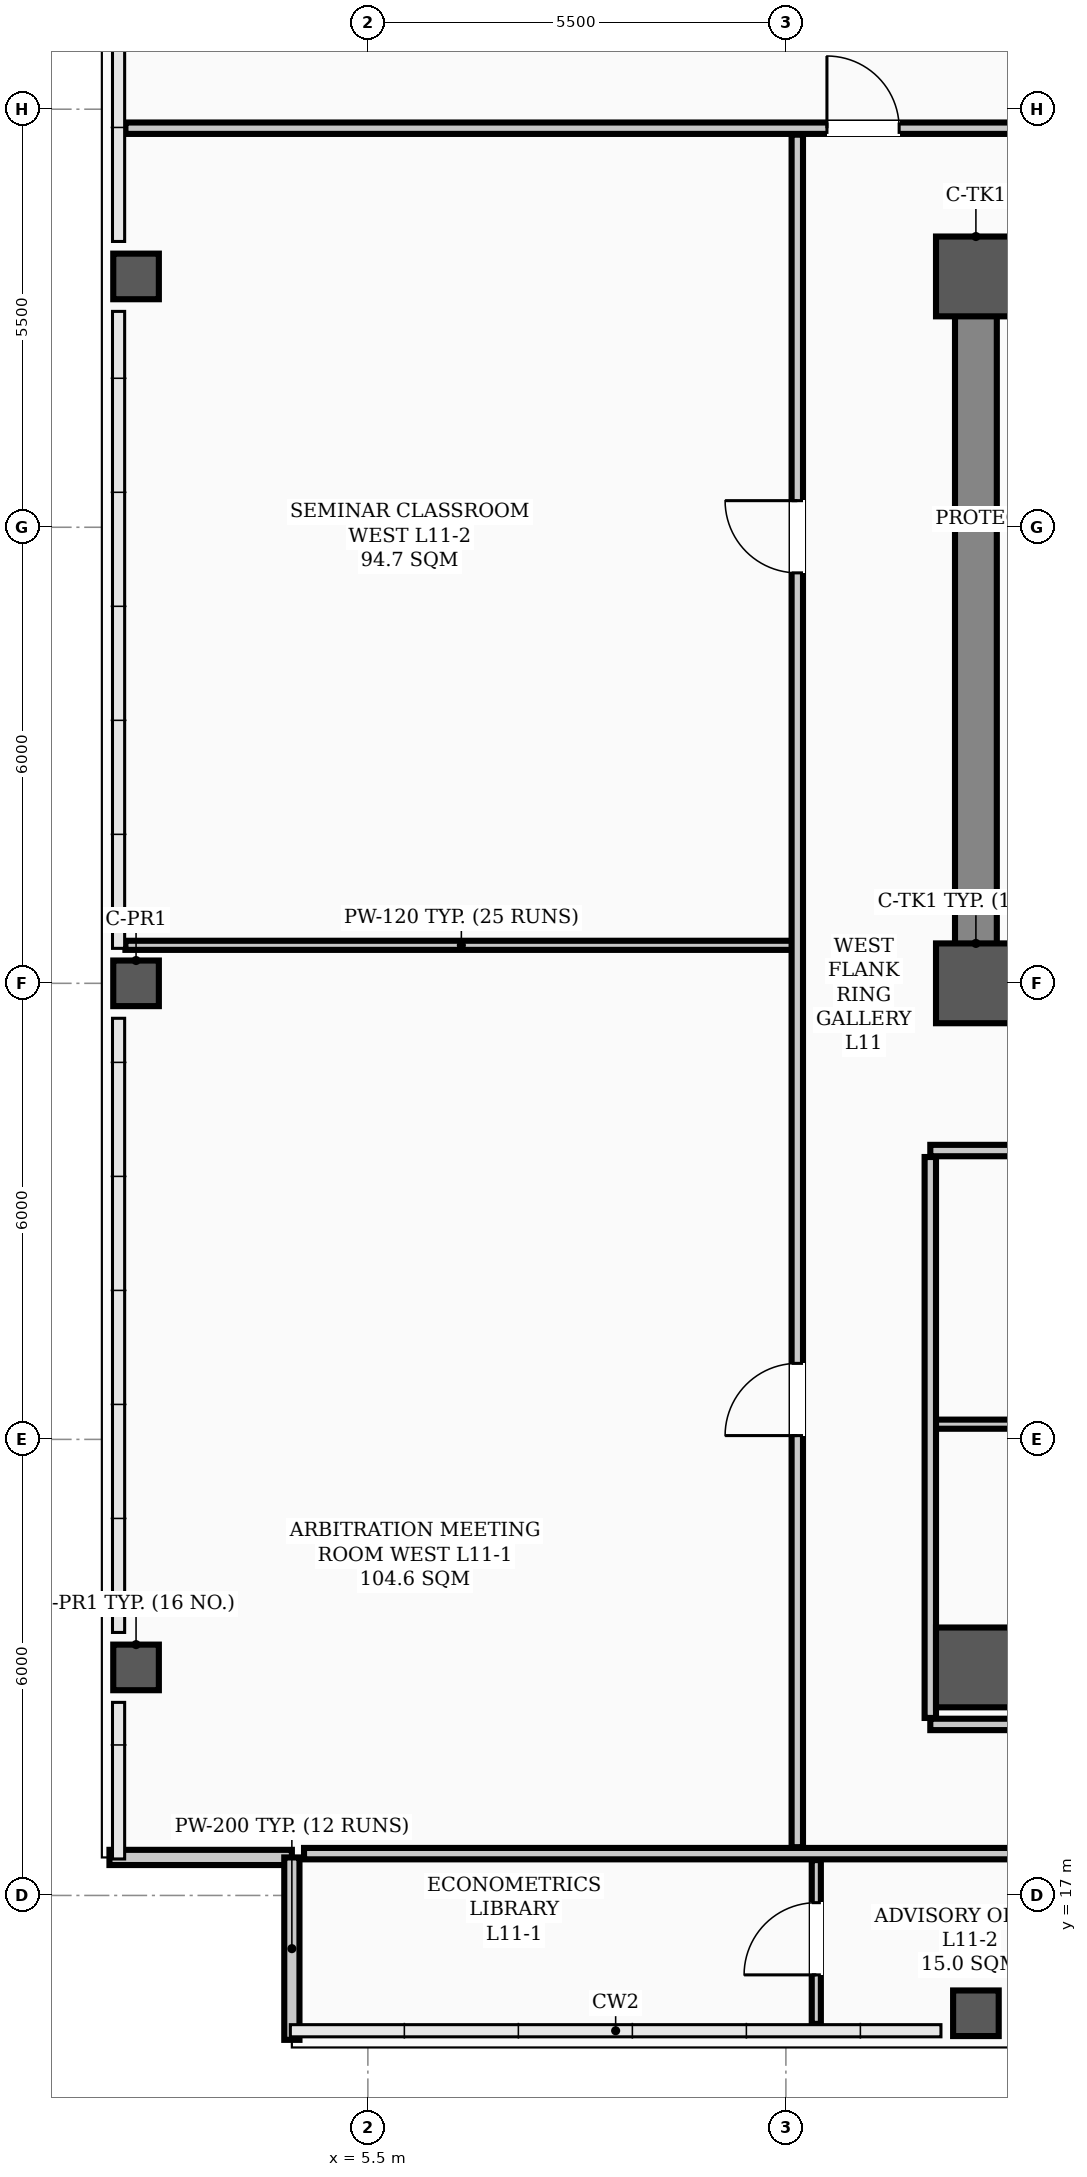
"""IFC4 building model, lengths in metres.
Left out: names, types, materials, properties, quantities, classifications, styles, units other than length and angle.
Written with IfcOpenShell. Run it as: python <this file> out.ifc"""

import sys

from ifc_helpers import new_model, si_unit, direction, frame, frame_2d, origin, origin_2d, place, context, subcontext, project, spatial, rectangle, hollow_rectangle, extrude, element, fill, save


model = new_model("IFC4")
c1 = context("Model", 3, precision=1e-05, world=origin(), true_north=direction((0.0, 1.0)))
c2 = subcontext(c1, "Body", "Model", "MODEL_VIEW")
j1 = project(units=[si_unit("LENGTHUNIT", "METRE"), si_unit("PLANEANGLEUNIT", "RADIAN")], contexts=[c1])
p1 = place(None, origin())
s1 = spatial("IfcSite", under=j1, at=p1, CompositionType="ELEMENT")
p2 = place(p1, origin())
s2 = spatial("IfcBuilding", under=s1, at=p2, CompositionType="ELEMENT")
p3 = place(p2, frame((0.0, 0.0, 46.0)))
s3 = spatial("IfcBuildingStorey", under=s2, at=p3, CompositionType="ELEMENT", Elevation=46.0)
for number, where, z_axis, x_axis in (
    (1, (13.5, 29.0, 0.0), (0.0, 0.0, 1.0), (1.0, 0.0, 0.0)),
    (2, (13.5, 38.3, 0.0), (0.0, 0.0, 1.0), (1.0, 0.0, 0.0)),
    (3, (13.5, 20.0, 0.0), (0.0, 0.0, 1.0), (1.0, 0.0, 0.0)),
):
    element("IfcColumn", number, at=place(p3, frame(where, z_axis=z_axis, x_axis=x_axis)), inside=s3, PredefinedType="COLUMN", context=c2, shape_type="SweptSolid", body=[
        extrude(hollow_rectangle(XDim=1.05, YDim=1.05, WallThickness=0.038, InnerFilletRadius=0.019, OuterFilletRadius=0.057, at=origin_2d()), origin(), (0.0, 0.0, 1.0), 3.9),
    ])
for number, where, z_axis, x_axis in (
    (4, (2.45, 20.0, 0.0), (0.0, 0.0, 1.0), (1.0, 0.0, 0.0)),
    (5, (2.45, 29.0, 0.0), (0.0, 0.0, 1.0), (1.0, 0.0, 0.0)),
    (6, (2.45, 38.3, 0.0), (0.0, 0.0, 1.0), (1.0, 0.0, 0.0)),
    (7, (13.5, 15.45, 0.0), (0.0, 0.0, 1.0), (1.0, 0.0, 0.0)),
):
    element("IfcColumn", number, at=place(p3, frame(where, z_axis=z_axis, x_axis=x_axis)), inside=s3, PredefinedType="COLUMN", context=c2, shape_type="SweptSolid", body=[
        extrude(hollow_rectangle(XDim=0.6, YDim=0.6, WallThickness=0.026, InnerFilletRadius=0.013, OuterFilletRadius=0.039, at=origin_2d()), origin(), (0.0, 0.0, 1.0), 3.9),
    ])
for number, where, z_axis, x_axis in (
    (8, (2.1, 17.5, 0.0), (0.0, 0.0, 1.0), (1.0, 0.0, 0.0)),
    (9, (4.5, 17.5, 0.0), (0.0, 0.0, 1.0), (0.0, -1.0, 0.0)),
):
    element("IfcWall", number, at=place(p3, frame(where, z_axis=z_axis, x_axis=x_axis)), inside=s3, PredefinedType="PARAPET", context=c2, shape_type="SweptSolid", body=[
        extrude(rectangle(XDim=2.4, YDim=0.2, at=frame_2d((1.2, 0.0))), origin(), (0.0, 0.0, 1.0), 1.2),
    ])
p4 = place(p3, frame((13.5, 29.0, 0.0), z_axis=(0.0, 0.0, 1.0), x_axis=(1.0, 0.0, 0.0)))
e10 = element("IfcWall", 10, at=p4, inside=s3, PredefinedType="SHEAR", context=c2, shape_type="SweptSolid", body=[
    extrude(rectangle(XDim=30.5, YDim=0.55, at=frame_2d((15.25, 0.0))), origin(), (0.0, 0.0, 1.0), 3.72),
])
p5 = place(p4, frame((1.75, 0.0, 0.0)))
e11 = element("IfcOpeningElement", 11, at=p5, cuts=e10, PredefinedType="OPENING", context=c2, shape_type="SweptSolid", body=[
    extrude(rectangle(XDim=1.1, YDim=2.08, at=frame_2d((0.55, 1.04))), frame((0.0, 0.285, 0.0), z_axis=(0.0, -1.0, 0.0), x_axis=(1.0, 0.0, 0.0)), (0.0, 0.0, 1.0), 0.57),
])
p6 = place(p4, frame((26.7, 0.0, 0.0)))
e12 = element("IfcOpeningElement", 12, at=p6, cuts=e10, PredefinedType="OPENING", context=c2, shape_type="SweptSolid", body=[
    extrude(rectangle(XDim=1.1, YDim=2.08, at=frame_2d((0.55, 1.04))), frame((0.0, 0.285, 0.0), z_axis=(0.0, -1.0, 0.0), x_axis=(1.0, 0.0, 0.0)), (0.0, 0.0, 1.0), 0.57),
])
p7 = place(p4, frame((6.8, 0.0, 0.0)))
e13 = element("IfcOpeningElement", 13, at=p7, cuts=e10, PredefinedType="OPENING", context=c2, shape_type="SweptSolid", body=[
    extrude(rectangle(XDim=1.1, YDim=2.08, at=frame_2d((0.55, 1.04))), frame((0.0, 0.285, 0.0), z_axis=(0.0, -1.0, 0.0), x_axis=(1.0, 0.0, 0.0)), (0.0, 0.0, 1.0), 0.57),
])
p8 = place(p4, frame((13.2, 0.0, 0.0)))
e14 = element("IfcOpeningElement", 14, at=p8, cuts=e10, PredefinedType="OPENING", context=c2, shape_type="SweptSolid", body=[
    extrude(rectangle(XDim=1.6, YDim=2.08, at=frame_2d((0.8, 1.04))), frame((0.0, 0.285, 0.0), z_axis=(0.0, -1.0, 0.0), x_axis=(1.0, 0.0, 0.0)), (0.0, 0.0, 1.0), 0.57),
])
p9 = place(p4, frame((19.6, 0.0, 0.0)))
e15 = element("IfcOpeningElement", 15, at=p9, cuts=e10, PredefinedType="OPENING", context=c2, shape_type="SweptSolid", body=[
    extrude(rectangle(XDim=0.9, YDim=2.08, at=frame_2d((0.45, 1.04))), frame((0.0, 0.285, 0.0), z_axis=(0.0, -1.0, 0.0), x_axis=(1.0, 0.0, 0.0)), (0.0, 0.0, 1.0), 0.57),
])
p10 = place(p4, frame((21.6, 0.0, 0.0)))
e16 = element("IfcOpeningElement", 16, at=p10, cuts=e10, PredefinedType="OPENING", context=c2, shape_type="SweptSolid", body=[
    extrude(rectangle(XDim=0.9, YDim=2.08, at=frame_2d((0.45, 1.04))), frame((0.0, 0.285, 0.0), z_axis=(0.0, -1.0, 0.0), x_axis=(1.0, 0.0, 0.0)), (0.0, 0.0, 1.0), 0.57),
])
p11 = place(p3, frame((13.5, 38.3, 0.0), z_axis=(0.0, 0.0, 1.0), x_axis=(1.0, 0.0, 0.0)))
e17 = element("IfcWall", 17, at=p11, inside=s3, PredefinedType="SHEAR", context=c2, shape_type="SweptSolid", body=[
    extrude(rectangle(XDim=30.5, YDim=0.55, at=frame_2d((15.25, 0.0))), origin(), (0.0, 0.0, 1.0), 3.72),
])
p12 = place(p3, frame((13.5, 29.35, 0.0), z_axis=(0.0, 0.0, 1.0), x_axis=(0.0, 1.0, 0.0)))
e18 = element("IfcWall", 18, at=p12, inside=s3, PredefinedType="SHEAR", context=c2, shape_type="SweptSolid", body=[
    extrude(rectangle(XDim=8.6, YDim=0.55, at=frame_2d((4.3, 0.0))), origin(), (0.0, 0.0, 1.0), 3.72),
])
p13 = place(p3, frame((12.9, 26.8, 0.0), z_axis=(0.0, 0.0, 1.0), x_axis=(1.0, 0.0, 0.0)))
e19 = element("IfcWall", 19, at=p13, inside=s3, PredefinedType="PARTITIONING", context=c2, shape_type="SweptSolid", body=[
    extrude(rectangle(XDim=31.7, YDim=0.15, at=frame_2d((15.85, 0.0))), origin(), (0.0, 0.0, 1.0), 3.1),
])
p14 = place(p13, frame((13.6, 0.0, 0.0)))
e20 = element("IfcOpeningElement", 20, at=p14, cuts=e19, PredefinedType="OPENING", context=c2, shape_type="SweptSolid", body=[
    extrude(rectangle(XDim=1.6, YDim=2.08, at=frame_2d((0.8, 1.04))), frame((0.0, 0.085, 0.0), z_axis=(0.0, -1.0, 0.0), x_axis=(1.0, 0.0, 0.0)), (0.0, 0.0, 1.0), 0.17),
])
p15 = place(p13, frame((2.175, 0.0, 0.0)))
e21 = element("IfcOpeningElement", 21, at=p15, cuts=e19, PredefinedType="OPENING", context=c2, shape_type="SweptSolid", body=[
    extrude(rectangle(XDim=0.95, YDim=2.08, at=frame_2d((0.475, 1.04))), frame((0.0, 0.085, 0.0), z_axis=(0.0, -1.0, 0.0), x_axis=(1.0, 0.0, 0.0)), (0.0, 0.0, 1.0), 0.17),
])
p16 = place(p13, frame((6.925, 0.0, 0.0)))
e22 = element("IfcOpeningElement", 22, at=p16, cuts=e19, PredefinedType="OPENING", context=c2, shape_type="SweptSolid", body=[
    extrude(rectangle(XDim=0.95, YDim=2.08, at=frame_2d((0.475, 1.04))), frame((0.0, 0.085, 0.0), z_axis=(0.0, -1.0, 0.0), x_axis=(1.0, 0.0, 0.0)), (0.0, 0.0, 1.0), 0.17),
])
p17 = place(p13, frame((10.925, 0.0, 0.0)))
e23 = element("IfcOpeningElement", 23, at=p17, cuts=e19, PredefinedType="OPENING", context=c2, shape_type="SweptSolid", body=[
    extrude(rectangle(XDim=0.95, YDim=2.08, at=frame_2d((0.475, 1.04))), frame((0.0, 0.085, 0.0), z_axis=(0.0, -1.0, 0.0), x_axis=(1.0, 0.0, 0.0)), (0.0, 0.0, 1.0), 0.17),
])
p18 = place(p13, frame((16.025, 0.0, 0.0)))
e24 = element("IfcOpeningElement", 24, at=p18, cuts=e19, PredefinedType="OPENING", context=c2, shape_type="SweptSolid", body=[
    extrude(rectangle(XDim=0.95, YDim=2.08, at=frame_2d((0.475, 1.04))), frame((0.0, 0.085, 0.0), z_axis=(0.0, -1.0, 0.0), x_axis=(1.0, 0.0, 0.0)), (0.0, 0.0, 1.0), 0.17),
])
p19 = place(p13, frame((21.725, 0.0, 0.0)))
e25 = element("IfcOpeningElement", 25, at=p19, cuts=e19, PredefinedType="OPENING", context=c2, shape_type="SweptSolid", body=[
    extrude(rectangle(XDim=0.95, YDim=2.08, at=frame_2d((0.475, 1.04))), frame((0.0, 0.085, 0.0), z_axis=(0.0, -1.0, 0.0), x_axis=(1.0, 0.0, 0.0)), (0.0, 0.0, 1.0), 0.17),
])
p20 = place(p13, frame((27.925, 0.0, 0.0)))
e26 = element("IfcOpeningElement", 26, at=p20, cuts=e19, PredefinedType="OPENING", context=c2, shape_type="SweptSolid", body=[
    extrude(rectangle(XDim=0.95, YDim=2.08, at=frame_2d((0.475, 1.04))), frame((0.0, 0.085, 0.0), z_axis=(0.0, -1.0, 0.0), x_axis=(1.0, 0.0, 0.0)), (0.0, 0.0, 1.0), 0.17),
])
p21 = place(p3, frame((4.66, 17.55, 0.0), z_axis=(0.0, 0.0, 1.0), x_axis=(1.0, 0.0, 0.0)))
e27 = element("IfcWall", 27, at=p21, inside=s3, PredefinedType="PARTITIONING", context=c2, shape_type="SweptSolid", body=[
    extrude(rectangle(XDim=44.68, YDim=0.15, at=frame_2d((22.34, 0.0))), origin(), (0.0, 0.0, 1.0), 3.1),
])
p22 = place(p21, frame((10.565, 0.0, 0.0)))
e28 = element("IfcOpeningElement", 28, at=p22, cuts=e27, PredefinedType="OPENING", context=c2, shape_type="SweptSolid", body=[
    extrude(rectangle(XDim=0.95, YDim=2.08, at=frame_2d((0.475, 1.04))), frame((0.0, 0.085, 0.0), z_axis=(0.0, -1.0, 0.0), x_axis=(1.0, 0.0, 0.0)), (0.0, 0.0, 1.0), 0.17),
])
p23 = place(p21, frame((16.165, 0.0, 0.0)))
e29 = element("IfcOpeningElement", 29, at=p23, cuts=e27, PredefinedType="OPENING", context=c2, shape_type="SweptSolid", body=[
    extrude(rectangle(XDim=0.95, YDim=2.08, at=frame_2d((0.475, 1.04))), frame((0.0, 0.085, 0.0), z_axis=(0.0, -1.0, 0.0), x_axis=(1.0, 0.0, 0.0)), (0.0, 0.0, 1.0), 0.17),
])
p24 = place(p21, frame((30.565, 0.0, 0.0)))
e30 = element("IfcOpeningElement", 30, at=p24, cuts=e27, PredefinedType="OPENING", context=c2, shape_type="SweptSolid", body=[
    extrude(rectangle(XDim=0.95, YDim=2.08, at=frame_2d((0.475, 1.04))), frame((0.0, 0.085, 0.0), z_axis=(0.0, -1.0, 0.0), x_axis=(1.0, 0.0, 0.0)), (0.0, 0.0, 1.0), 0.17),
])
p25 = place(p21, frame((37.365, 0.0, 0.0)))
e31 = element("IfcOpeningElement", 31, at=p25, cuts=e27, PredefinedType="OPENING", context=c2, shape_type="SweptSolid", body=[
    extrude(rectangle(XDim=0.95, YDim=2.08, at=frame_2d((0.475, 1.04))), frame((0.0, 0.085, 0.0), z_axis=(0.0, -1.0, 0.0), x_axis=(1.0, 0.0, 0.0)), (0.0, 0.0, 1.0), 0.17),
])
p26 = place(p3, frame((12.9, 19.25, 0.0), z_axis=(0.0, 0.0, 1.0), x_axis=(1.0, 0.0, 0.0)))
e32 = element("IfcWall", 32, at=p26, inside=s3, PredefinedType="PARTITIONING", context=c2, shape_type="SweptSolid", body=[
    extrude(rectangle(XDim=13.3, YDim=0.15, at=frame_2d((6.65, 0.0))), origin(), (0.0, 0.0, 1.0), 3.1),
])
p27 = place(p26, frame((2.175, 0.0, 0.0)))
e33 = element("IfcOpeningElement", 33, at=p27, cuts=e32, PredefinedType="OPENING", context=c2, shape_type="SweptSolid", body=[
    extrude(rectangle(XDim=0.95, YDim=2.08, at=frame_2d((0.475, 1.04))), frame((0.0, 0.085, 0.0), z_axis=(0.0, -1.0, 0.0), x_axis=(1.0, 0.0, 0.0)), (0.0, 0.0, 1.0), 0.17),
])
p28 = place(p26, frame((6.925, 0.0, 0.0)))
e34 = element("IfcOpeningElement", 34, at=p28, cuts=e32, PredefinedType="OPENING", context=c2, shape_type="SweptSolid", body=[
    extrude(rectangle(XDim=0.95, YDim=2.08, at=frame_2d((0.475, 1.04))), frame((0.0, 0.085, 0.0), z_axis=(0.0, -1.0, 0.0), x_axis=(1.0, 0.0, 0.0)), (0.0, 0.0, 1.0), 0.17),
])
p29 = place(p26, frame((12.19, 0.0, 0.0)))
e35 = element("IfcOpeningElement", 35, at=p29, cuts=e32, PredefinedType="OPENING", context=c2, shape_type="SweptSolid", body=[
    extrude(rectangle(XDim=0.95, YDim=2.08, at=frame_2d((0.475, 1.04))), frame((0.0, 0.085, 0.0), z_axis=(0.0, -1.0, 0.0), x_axis=(1.0, 0.0, 0.0)), (0.0, 0.0, 1.0), 0.17),
])
p30 = place(p3, frame((12.9, 23.2, 0.0), z_axis=(0.0, 0.0, 1.0), x_axis=(1.0, 0.0, 0.0)))
e36 = element("IfcWall", 36, at=p30, inside=s3, PredefinedType="PARTITIONING", context=c2, shape_type="SweptSolid", body=[
    extrude(rectangle(XDim=5.3, YDim=0.12, at=frame_2d((2.65, 0.0))), origin(), (0.0, 0.0, 1.0), 3.1),
])
p31 = place(p3, frame((2.31, 29.5, 0.0), z_axis=(0.0, 0.0, 1.0), x_axis=(1.0, 0.0, 0.0)))
e37 = element("IfcWall", 37, at=p31, inside=s3, PredefinedType="PARTITIONING", context=c2, shape_type="SweptSolid", body=[
    extrude(rectangle(XDim=8.84, YDim=0.12, at=frame_2d((4.42, 0.0))), origin(), (0.0, 0.0, 1.0), 3.0),
])
p32 = place(p3, frame((2.31, 40.25, 0.0), z_axis=(0.0, 0.0, 1.0), x_axis=(1.0, 0.0, 0.0)))
e38 = element("IfcWall", 38, at=p32, inside=s3, PredefinedType="PARTITIONING", context=c2, shape_type="SweptSolid", body=[
    extrude(rectangle(XDim=49.38, YDim=0.15, at=frame_2d((24.69, 0.0))), origin(), (0.0, 0.0, 1.0), 3.1),
])
p33 = place(p32, frame((9.23, 0.0, 0.0)))
e39 = element("IfcOpeningElement", 39, at=p33, cuts=e38, PredefinedType="OPENING", context=c2, shape_type="SweptSolid", body=[
    extrude(rectangle(XDim=0.95, YDim=2.08, at=frame_2d((0.475, 1.04))), frame((0.0, 0.085, 0.0), z_axis=(0.0, -1.0, 0.0), x_axis=(1.0, 0.0, 0.0)), (0.0, 0.0, 1.0), 0.17),
])
p34 = place(p32, frame((17.215, 0.0, 0.0)))
e40 = element("IfcOpeningElement", 40, at=p34, cuts=e38, PredefinedType="OPENING", context=c2, shape_type="SweptSolid", body=[
    extrude(rectangle(XDim=0.95, YDim=2.08, at=frame_2d((0.475, 1.04))), frame((0.0, 0.085, 0.0), z_axis=(0.0, -1.0, 0.0), x_axis=(1.0, 0.0, 0.0)), (0.0, 0.0, 1.0), 0.17),
])
p35 = place(p32, frame((24.915, 0.0, 0.0)))
e41 = element("IfcOpeningElement", 41, at=p35, cuts=e38, PredefinedType="OPENING", context=c2, shape_type="SweptSolid", body=[
    extrude(rectangle(XDim=0.95, YDim=2.08, at=frame_2d((0.475, 1.04))), frame((0.0, 0.085, 0.0), z_axis=(0.0, -1.0, 0.0), x_axis=(1.0, 0.0, 0.0)), (0.0, 0.0, 1.0), 0.17),
])
p36 = place(p32, frame((32.815, 0.0, 0.0)))
e42 = element("IfcOpeningElement", 42, at=p36, cuts=e38, PredefinedType="OPENING", context=c2, shape_type="SweptSolid", body=[
    extrude(rectangle(XDim=0.95, YDim=2.08, at=frame_2d((0.475, 1.04))), frame((0.0, 0.085, 0.0), z_axis=(0.0, -1.0, 0.0), x_axis=(1.0, 0.0, 0.0)), (0.0, 0.0, 1.0), 0.17),
])
p37 = place(p32, frame((42.7, 0.0, 0.0)))
e43 = element("IfcOpeningElement", 43, at=p37, cuts=e38, PredefinedType="OPENING", context=c2, shape_type="SweptSolid", body=[
    extrude(rectangle(XDim=0.95, YDim=2.08, at=frame_2d((0.475, 1.04))), frame((0.0, 0.085, 0.0), z_axis=(0.0, -1.0, 0.0), x_axis=(1.0, 0.0, 0.0)), (0.0, 0.0, 1.0), 0.17),
])
p38 = place(p3, frame((11.15, 17.635, 0.0), z_axis=(0.0, 0.0, 1.0), x_axis=(0.0, 1.0, 0.0)))
e44 = element("IfcWall", 44, at=p38, inside=s3, PredefinedType="PARTITIONING", context=c2, shape_type="SweptSolid", body=[
    extrude(rectangle(XDim=22.53, YDim=0.15, at=frame_2d((11.265, 0.0))), origin(), (0.0, 0.0, 1.0), 3.0),
])
p39 = place(p38, frame((5.415, 0.0, 0.0)))
e45 = element("IfcOpeningElement", 45, at=p39, cuts=e44, PredefinedType="OPENING", context=c2, shape_type="SweptSolid", body=[
    extrude(rectangle(XDim=0.95, YDim=2.08, at=frame_2d((0.475, 1.04))), frame((0.0, 0.085, 0.0), z_axis=(0.0, -1.0, 0.0), x_axis=(1.0, 0.0, 0.0)), (0.0, 0.0, 1.0), 0.17),
])
p40 = place(p38, frame((16.765, 0.0, 0.0)))
e46 = element("IfcOpeningElement", 46, at=p40, cuts=e44, PredefinedType="OPENING", context=c2, shape_type="SweptSolid", body=[
    extrude(rectangle(XDim=0.95, YDim=2.08, at=frame_2d((0.475, 1.04))), frame((0.0, 0.085, 0.0), z_axis=(0.0, -1.0, 0.0), x_axis=(1.0, 0.0, 0.0)), (0.0, 0.0, 1.0), 0.17),
])
p41 = place(p3, frame((12.9, 19.335, 0.0), z_axis=(0.0, 0.0, 1.0), x_axis=(0.0, 1.0, 0.0)))
e47 = element("IfcWall", 47, at=p41, inside=s3, PredefinedType="PARTITIONING", context=c2, shape_type="SweptSolid", body=[
    extrude(rectangle(XDim=7.38, YDim=0.15, at=frame_2d((3.69, 0.0))), origin(), (0.0, 0.0, 1.0), 3.0),
])
p42 = place(p3, frame((11.4, 15.31, 0.0), z_axis=(0.0, 0.0, 1.0), x_axis=(0.0, 1.0, 0.0)))
e48 = element("IfcWall", 48, at=p42, inside=s3, PredefinedType="PARTITIONING", context=c2, shape_type="SweptSolid", body=[
    extrude(rectangle(XDim=2.155, YDim=0.12, at=frame_2d((1.078, 0.0))), origin(), (0.0, 0.0, 1.0), 3.72),
])
p43 = place(p42, frame((0.645, 0.0, 0.0)))
e49 = element("IfcOpeningElement", 49, at=p43, cuts=e48, PredefinedType="OPENING", context=c2, shape_type="SweptSolid", body=[
    extrude(rectangle(XDim=0.95, YDim=2.08, at=frame_2d((0.475, 1.04))), frame((0.0, 0.07, 0.0), z_axis=(0.0, -1.0, 0.0), x_axis=(1.0, 0.0, 0.0)), (0.0, 0.0, 1.0), 0.14),
])
p44 = place(p43, origin())
e50 = element("IfcDoor", 50, at=p44, inside=s3, OperationType="SINGLE_SWING_LEFT", PredefinedType="DOOR", context=c2, shape_type="SweptSolid", body=[
    extrude(rectangle(XDim=0.95, YDim=2.08, at=frame_2d((0.475, 1.04))), frame((0.0, 0.025, 0.0), z_axis=(0.0, -1.0, 0.0), x_axis=(1.0, 0.0, 0.0)), (0.0, 0.0, 1.0), 0.05),
])
fill(e49, e50)
p45 = place(p39, origin())
e51 = element("IfcDoor", 51, at=p45, inside=s3, OperationType="SINGLE_SWING_LEFT", PredefinedType="DOOR", context=c2, shape_type="SweptSolid", body=[
    extrude(rectangle(XDim=0.95, YDim=2.08, at=frame_2d((0.475, 1.04))), frame((0.0, 0.025, 0.0), z_axis=(0.0, -1.0, 0.0), x_axis=(1.0, 0.0, 0.0)), (0.0, 0.0, 1.0), 0.05),
])
fill(e45, e51)
p46 = place(p40, origin())
e52 = element("IfcDoor", 52, at=p46, inside=s3, OperationType="SINGLE_SWING_RIGHT", PredefinedType="DOOR", context=c2, shape_type="SweptSolid", body=[
    extrude(rectangle(XDim=0.95, YDim=2.08, at=frame_2d((0.475, 1.04))), frame((0.0, 0.025, 0.0), z_axis=(0.0, -1.0, 0.0), x_axis=(1.0, 0.0, 0.0)), (0.0, 0.0, 1.0), 0.05),
])
fill(e46, e52)
p47 = place(p33, origin())
e53 = element("IfcDoor", 53, at=p47, inside=s3, OperationType="SINGLE_SWING_LEFT", PredefinedType="DOOR", context=c2, shape_type="SweptSolid", body=[
    extrude(rectangle(XDim=0.95, YDim=2.08, at=frame_2d((0.475, 1.04))), frame((0.0, 0.025, 0.0), z_axis=(0.0, -1.0, 0.0), x_axis=(1.0, 0.0, 0.0)), (0.0, 0.0, 1.0), 0.05),
])
fill(e39, e53)
save(model, sys.argv[1])
